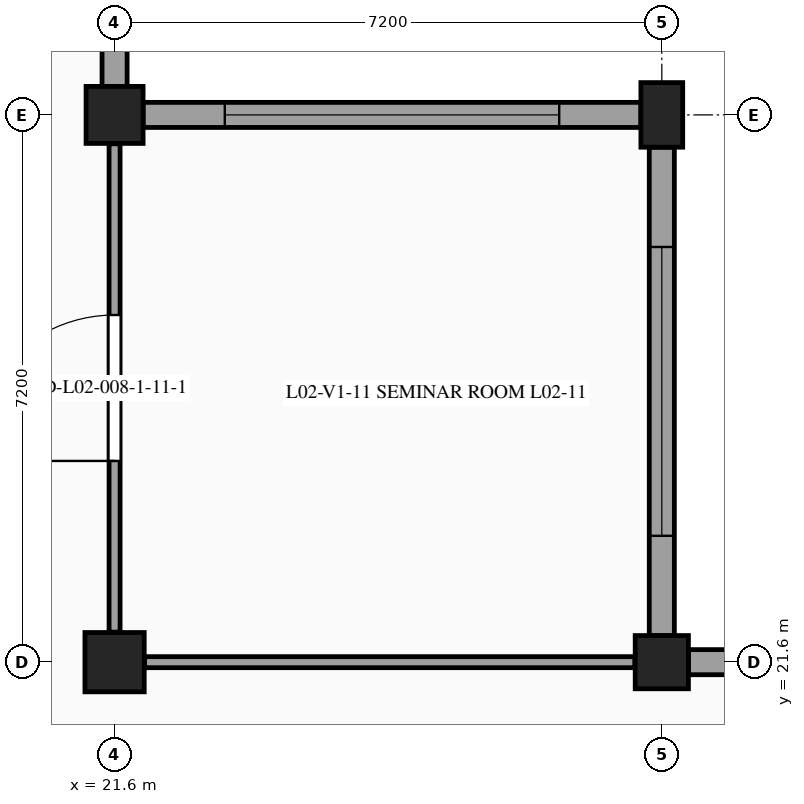
"""IFC4 building model, lengths in metres.
Left out: names, types, materials, properties, quantities, classifications, styles, units other than length and angle.
Written with IfcOpenShell. Run it as: python <this file> out.ifc"""

import sys

from ifc_helpers import new_model, si_unit, direction, frame, frame_2d, origin, origin_2d, place, context, subcontext, project, spatial, rectangle, extrude, element, fill, save


model = new_model("IFC4")
c1 = context("Model", 3, precision=1e-05, world=origin(), true_north=direction((0.0, 1.0)))
c2 = subcontext(c1, "Body", "Model", "MODEL_VIEW")
j1 = project(units=[si_unit("LENGTHUNIT", "METRE"), si_unit("PLANEANGLEUNIT", "RADIAN")], contexts=[c1])
p1 = place(None, origin())
s1 = spatial("IfcSite", under=j1, at=p1, CompositionType="ELEMENT")
p2 = place(p1, origin())
s2 = spatial("IfcBuilding", under=s1, at=p2, CompositionType="ELEMENT")
p3 = place(p2, frame((0.0, 0.0, 9.9)))
s3 = spatial("IfcBuildingStorey", under=s2, at=p3, CompositionType="ELEMENT", Elevation=9.9)
p4 = place(p3, frame((21.6, 21.6, 0.0), z_axis=(0.0, 0.0, 1.0), x_axis=(1.0, 0.0, 0.0)))
e1 = element("IfcColumn", 1, at=p4, inside=s3, PredefinedType="COLUMN", context=c2, shape_type="SweptSolid", body=[
    extrude(rectangle(XDim=0.78, YDim=0.78, at=origin_2d()), origin(), (0.0, 0.0, 1.0), 4.5),
])
p5 = place(p3, frame((21.6, 28.8, 0.0), z_axis=(0.0, 0.0, 1.0), x_axis=(1.0, 0.0, 0.0)))
e2 = element("IfcColumn", 2, at=p5, inside=s3, PredefinedType="COLUMN", context=c2, shape_type="SweptSolid", body=[
    extrude(rectangle(XDim=0.75, YDim=0.75, at=origin_2d()), origin(), (0.0, 0.0, 1.0), 4.5),
])
p6 = place(p3, frame((28.8, 21.6, 0.0), z_axis=(0.0, 0.0, 1.0), x_axis=(1.0, 0.0, 0.0)))
e3 = element("IfcColumn", 3, at=p6, inside=s3, PredefinedType="COLUMN", context=c2, shape_type="SweptSolid", body=[
    extrude(rectangle(XDim=0.7, YDim=0.7, at=origin_2d()), origin(), (0.0, 0.0, 1.0), 4.5),
])
p7 = place(p3, frame((28.8, 28.8, 0.0), z_axis=(0.0, 0.0, 1.0), x_axis=(1.0, 0.0, 0.0)))
e4 = element("IfcColumn", 4, at=p7, inside=s3, PredefinedType="COLUMN", context=c2, shape_type="SweptSolid", body=[
    extrude(rectangle(XDim=0.55, YDim=0.85, at=origin_2d()), origin(), (0.0, 0.0, 1.0), 4.5),
])
p8 = place(p3, frame((21.6, 35.64, 0.0), z_axis=(0.0, 0.0, 1.0), x_axis=(0.0, -1.0, 0.0)))
e5 = element("IfcWall", 5, at=p8, inside=s3, PredefinedType="STANDARD", context=c2, shape_type="SweptSolid", body=[
    extrude(rectangle(XDim=6.465, YDim=0.33, at=frame_2d((3.232, 0.0))), origin(), (0.0, 0.0, 1.0), 3.47),
])
p9 = place(p8, frame((0.683, 0.0, 0.98)))
e6 = element("IfcOpeningElement", 6, at=p9, cuts=e5, PredefinedType="OPENING", context=c2, shape_type="SweptSolid", body=[
    extrude(rectangle(XDim=5.1, YDim=1.75, at=frame_2d((2.55, 0.875))), frame((0.0, 0.175, 0.0), z_axis=(0.0, -1.0, 0.0), x_axis=(1.0, 0.0, 0.0)), (0.0, 0.0, 1.0), 0.35),
])
p10 = place(p3, frame((21.975, 28.8, 0.0), z_axis=(0.0, 0.0, 1.0), x_axis=(1.0, 0.0, 0.0)))
e7 = element("IfcWall", 7, at=p10, inside=s3, PredefinedType="STANDARD", context=c2, shape_type="SweptSolid", body=[
    extrude(rectangle(XDim=6.55, YDim=0.33, at=frame_2d((3.275, 0.0))), origin(), (0.0, 0.0, 1.0), 3.47),
])
p11 = place(p10, frame((1.075, 0.0, 0.98)))
e8 = element("IfcOpeningElement", 8, at=p11, cuts=e7, PredefinedType="OPENING", context=c2, shape_type="SweptSolid", body=[
    extrude(rectangle(XDim=4.4, YDim=1.65, at=frame_2d((2.2, 0.825))), frame((0.0, 0.175, 0.0), z_axis=(0.0, -1.0, 0.0), x_axis=(1.0, 0.0, 0.0)), (0.0, 0.0, 1.0), 0.35),
])
p12 = place(p3, frame((28.8, 28.375, 0.0), z_axis=(0.0, 0.0, 1.0), x_axis=(0.0, -1.0, 0.0)))
e9 = element("IfcWall", 9, at=p12, inside=s3, PredefinedType="STANDARD", context=c2, shape_type="SweptSolid", body=[
    extrude(rectangle(XDim=6.425, YDim=0.33, at=frame_2d((3.212, 0.0))), origin(), (0.0, 0.0, 1.0), 3.47),
])
p13 = place(p12, frame((1.312, 0.0, 0.98)))
e10 = element("IfcOpeningElement", 10, at=p13, cuts=e9, PredefinedType="OPENING", context=c2, shape_type="SweptSolid", body=[
    extrude(rectangle(XDim=3.8, YDim=1.6, at=frame_2d((1.9, 0.8))), frame((0.0, 0.175, 0.0), z_axis=(0.0, -1.0, 0.0), x_axis=(1.0, 0.0, 0.0)), (0.0, 0.0, 1.0), 0.35),
])
p14 = place(p3, frame((29.15, 21.6, 0.0), z_axis=(0.0, 0.0, 1.0), x_axis=(1.0, 0.0, 0.0)))
e11 = element("IfcWall", 11, at=p14, inside=s3, PredefinedType="STANDARD", context=c2, shape_type="SweptSolid", body=[
    extrude(rectangle(XDim=6.46, YDim=0.33, at=frame_2d((3.23, 0.0))), origin(), (0.0, 0.0, 1.0), 3.47),
])
p15 = place(p14, frame((1.78, 0.0, 0.98)))
e12 = element("IfcOpeningElement", 12, at=p15, cuts=e11, PredefinedType="OPENING", context=c2, shape_type="SweptSolid", body=[
    extrude(rectangle(XDim=2.9, YDim=1.6, at=frame_2d((1.45, 0.8))), frame((0.0, 0.175, 0.0), z_axis=(0.0, -1.0, 0.0), x_axis=(1.0, 0.0, 0.0)), (0.0, 0.0, 1.0), 0.35),
])
p16 = place(p3, frame((21.6, 21.995, 0.0), z_axis=(0.0, 0.0, 1.0), x_axis=(0.0, 1.0, 0.0)))
e13 = element("IfcWall", 13, at=p16, inside=s3, PredefinedType="PARTITIONING", context=c2, shape_type="SweptSolid", body=[
    extrude(rectangle(XDim=6.425, YDim=0.145, at=frame_2d((3.212, 0.0))), origin(), (0.0, 0.0, 1.0), 3.53),
])
p17 = place(p16, frame((2.252, 0.0, 0.0)))
e14 = element("IfcOpeningElement", 14, at=p17, cuts=e13, PredefinedType="OPENING", context=c2, shape_type="SweptSolid", body=[
    extrude(rectangle(XDim=1.92, YDim=2.35, at=frame_2d((0.96, 1.175))), frame((0.0, 0.083, 0.0), z_axis=(0.0, -1.0, 0.0), x_axis=(1.0, 0.0, 0.0)), (0.0, 0.0, 1.0), 0.165),
])
p18 = place(p3, frame((21.995, 21.6, 0.0), z_axis=(0.0, 0.0, 1.0), x_axis=(1.0, 0.0, 0.0)))
e15 = element("IfcWall", 15, at=p18, inside=s3, PredefinedType="PARTITIONING", context=c2, shape_type="SweptSolid", body=[
    extrude(rectangle(XDim=6.45, YDim=0.145, at=frame_2d((3.225, 0.0))), origin(), (0.0, 0.0, 1.0), 3.525),
])
p19 = place(p11, origin())
e16 = element("IfcWindow", 16, at=p19, inside=s3, PartitioningType="SINGLE_PANEL", PredefinedType="WINDOW", context=c2, shape_type="SweptSolid", body=[
    extrude(rectangle(XDim=4.4, YDim=1.65, at=frame_2d((2.2, 0.825))), frame((0.0, -0.03, 0.0), z_axis=(0.0, -1.0, 0.0), x_axis=(1.0, 0.0, 0.0)), (0.0, 0.0, 1.0), 0.06),
])
fill(e8, e16)
p20 = place(p13, origin())
e17 = element("IfcWindow", 17, at=p20, inside=s3, PartitioningType="SINGLE_PANEL", PredefinedType="WINDOW", context=c2, shape_type="SweptSolid", body=[
    extrude(rectangle(XDim=3.8, YDim=1.6, at=frame_2d((1.9, 0.8))), frame((0.0, -0.03, 0.0), z_axis=(0.0, -1.0, 0.0), x_axis=(1.0, 0.0, 0.0)), (0.0, 0.0, 1.0), 0.06),
])
fill(e10, e17)
p21 = place(p17, origin())
e18 = element("IfcDoor", 18, at=p21, inside=s3, OperationType="SINGLE_SWING_LEFT", PredefinedType="DOOR", context=c2, shape_type="SweptSolid", body=[
    extrude(rectangle(XDim=1.92, YDim=2.35, at=frame_2d((0.96, 1.175))), frame((0.0, 0.025, 0.0), z_axis=(0.0, -1.0, 0.0), x_axis=(1.0, 0.0, 0.0)), (0.0, 0.0, 1.0), 0.05),
])
fill(e14, e18)
save(model, sys.argv[1])
